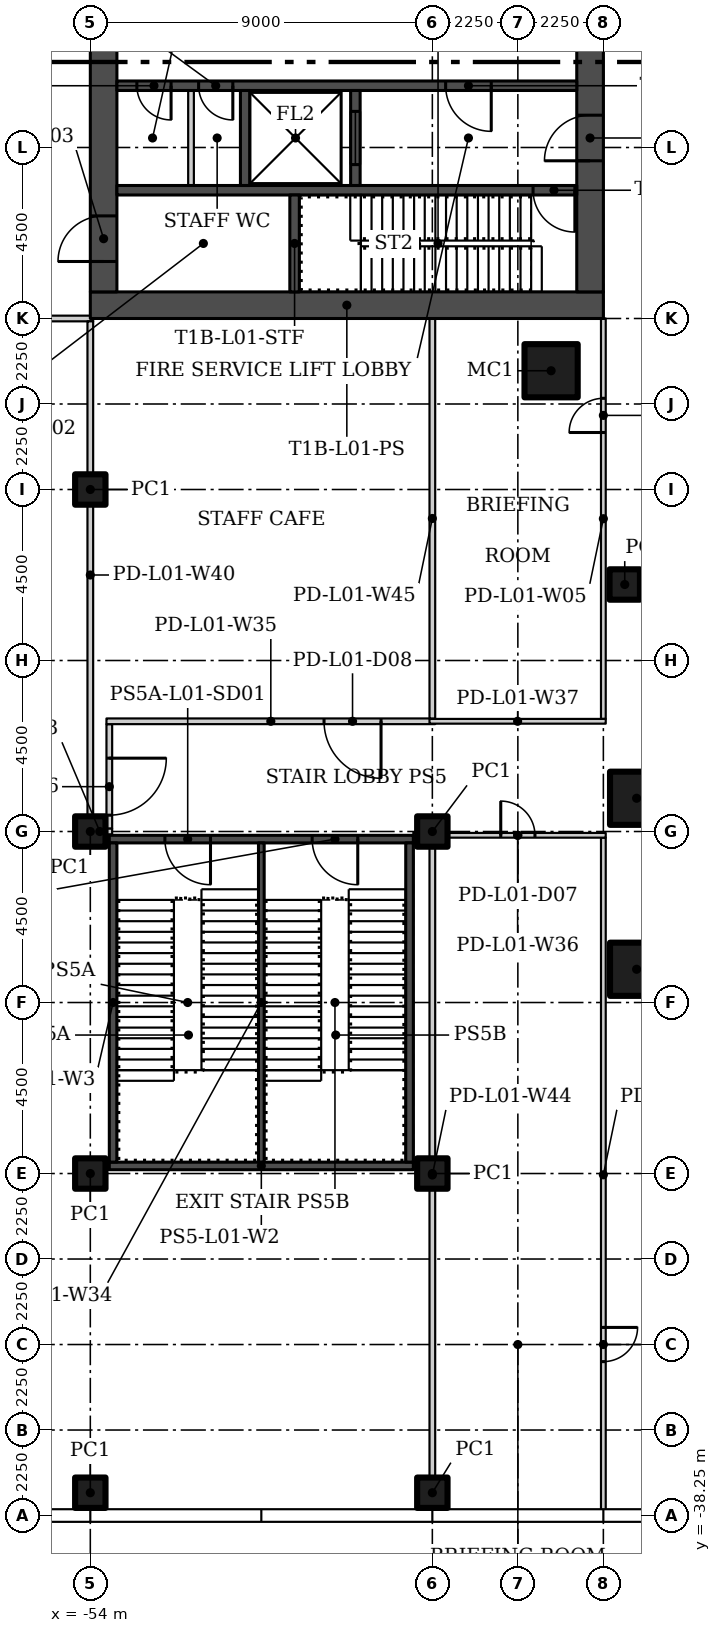
"""IFC4 building model, lengths in metres.
Left out: names, types, materials, properties, quantities, classifications, styles, units other than length and angle.
Written with IfcOpenShell. Run it as: python <this file> out.ifc"""

import sys

from ifc_helpers import new_model, si_unit, direction, frame, frame_2d, origin, origin_2d, place, context, subcontext, project, spatial, rectangle, hollow_rectangle, extrude, element, fill, save


model = new_model("IFC4")
c1 = context("Model", 3, precision=1e-05, world=origin(), true_north=direction((0.0, 1.0)))
c2 = subcontext(c1, "Body", "Model", "MODEL_VIEW")
j1 = project(units=[si_unit("LENGTHUNIT", "METRE"), si_unit("PLANEANGLEUNIT", "RADIAN")], contexts=[c1])
p1 = place(None, origin())
s1 = spatial("IfcSite", under=j1, at=p1, CompositionType="ELEMENT")
p2 = place(p1, origin())
s2 = spatial("IfcBuilding", under=s1, at=p2, CompositionType="ELEMENT")
p3 = place(p2, frame((0.0, 0.0, 6.5)))
s3 = spatial("IfcBuildingStorey", under=s2, at=p3, CompositionType="ELEMENT", Elevation=6.5)
p4 = place(p3, frame((-41.875, -8.125, 0.0)))
e1 = element("IfcColumn", 1, at=p4, inside=s3, PredefinedType="COLUMN", context=c2, shape_type="SweptSolid", body=[
    extrude(hollow_rectangle(XDim=1.4, YDim=1.4, WallThickness=0.06, at=origin_2d()), origin(), (0.0, 0.0, 1.0), 5.6),
])
p5 = place(p3, frame((-39.938, -13.75, 0.0)))
e2 = element("IfcColumn", 2, at=p5, inside=s3, PredefinedType="COLUMN", context=c2, shape_type="SweptSolid", body=[
    extrude(hollow_rectangle(XDim=0.8, YDim=0.8, WallThickness=0.03, at=origin_2d()), origin(), (0.0, 0.0, 1.0), 5.6),
])
for number, where in (
    (3, (-39.625, -19.375, 0.0)),
    (4, (-39.625, -23.875, 0.0)),
):
    element("IfcColumn", number, at=place(p3, frame(where)), inside=s3, PredefinedType="COLUMN", context=c2, shape_type="SweptSolid", body=[
        extrude(hollow_rectangle(XDim=1.4, YDim=1.4, WallThickness=0.06, at=origin_2d()), origin(), (0.0, 0.0, 1.0), 5.6),
    ])
for number, where in (
    (5, (-54.0, -37.65, 0.0)),
    (6, (-54.0, -29.25, 0.0)),
    (7, (-54.0, -20.25, 0.0)),
    (8, (-54.0, -11.25, 0.0)),
    (9, (-45.0, -37.65, 0.0)),
    (10, (-45.0, -29.25, 0.0)),
    (11, (-45.0, -20.25, 0.0)),
):
    element("IfcColumn", number, at=place(p3, frame(where)), inside=s3, PredefinedType="COLUMN", context=c2, shape_type="SweptSolid", body=[
        extrude(hollow_rectangle(XDim=0.8, YDim=0.8, WallThickness=0.03, at=origin_2d()), origin(), (0.0, 0.0, 1.0), 5.6),
    ])
p6 = place(p3, frame((-40.5, -20.412, 0.0), z_axis=(0.0, 0.0, 1.0), x_axis=(0.0, -1.0, 0.0)))
e12 = element("IfcWall", 12, at=p6, inside=s3, PredefinedType="PARTITIONING", context=c2, shape_type="SweptSolid", body=[
    extrude(rectangle(XDim=17.743, YDim=0.125, at=frame_2d((8.872, 0.0))), origin(), (0.0, 0.0, 1.0), 5.6),
])
p7 = place(p6, frame((12.888, 0.0, 0.0)))
e13 = element("IfcOpeningElement", 13, at=p7, cuts=e12, PredefinedType="OPENING", context=c2, shape_type="SweptSolid", body=[
    extrude(rectangle(XDim=0.9, YDim=2.1, at=frame_2d((0.45, 1.05))), frame((0.0, 0.073, 0.0), z_axis=(0.0, -1.0, 0.0), x_axis=(1.0, 0.0, 0.0)), (0.0, 0.0, 1.0), 0.145),
])
p8 = place(p3, frame((-40.5, -17.287, 0.0), z_axis=(0.0, 0.0, 1.0), x_axis=(0.0, 1.0, 0.0)))
e14 = element("IfcWall", 14, at=p8, inside=s3, PredefinedType="PARTITIONING", context=c2, shape_type="SweptSolid", body=[
    extrude(rectangle(XDim=10.537, YDim=0.125, at=frame_2d((5.269, 0.0))), origin(), (0.0, 0.0, 1.0), 5.6),
])
p9 = place(p8, frame((7.537, 0.0, 0.0)))
e15 = element("IfcOpeningElement", 15, at=p9, cuts=e14, PredefinedType="OPENING", context=c2, shape_type="SweptSolid", body=[
    extrude(rectangle(XDim=0.9, YDim=2.1, at=frame_2d((0.45, 1.05))), frame((0.0, 0.073, 0.0), z_axis=(0.0, -1.0, 0.0), x_axis=(1.0, 0.0, 0.0)), (0.0, 0.0, 1.0), 0.145),
])
p10 = place(p3, frame((-67.405, -6.75, 0.0)))
e16 = element("IfcWall", 16, at=p10, inside=s3, PredefinedType="PARTITIONING", context=c2, shape_type="SweptSolid", body=[
    extrude(rectangle(XDim=13.48, YDim=0.15, at=frame_2d((6.74, 0.0))), origin(), (0.0, 0.0, 1.0), 5.6),
])
p11 = place(p10, frame((7.255, 0.0, 0.0)))
e17 = element("IfcOpeningElement", 17, at=p11, cuts=e16, PredefinedType="OPENING", context=c2, shape_type="SweptSolid", body=[
    extrude(rectangle(XDim=1.8, YDim=2.4, at=frame_2d((0.9, 1.2))), frame((0.0, 0.085, 0.0), z_axis=(0.0, -1.0, 0.0), x_axis=(1.0, 0.0, 0.0)), (0.0, 0.0, 1.0), 0.17),
])
p12 = place(p10, frame((10.555, 0.0, 0.0)))
e18 = element("IfcOpeningElement", 18, at=p12, cuts=e16, PredefinedType="OPENING", context=c2, shape_type="SweptSolid", body=[
    extrude(rectangle(XDim=1.8, YDim=2.4, at=frame_2d((0.9, 1.2))), frame((0.0, 0.085, 0.0), z_axis=(0.0, -1.0, 0.0), x_axis=(1.0, 0.0, 0.0)), (0.0, 0.0, 1.0), 0.17),
])
p13 = place(p3, frame((-45.5, -20.35, 0.0)))
e19 = element("IfcWall", 19, at=p13, inside=s3, PredefinedType="PARTITIONING", context=c2, shape_type="SweptSolid", body=[
    extrude(rectangle(XDim=0.575, YDim=0.15, at=frame_2d((0.288, 0.0))), origin(), (0.0, 0.0, 1.0), 5.6),
])
p14 = place(p3, frame((-53.5, -17.425, 0.0), z_axis=(0.0, 0.0, 1.0), x_axis=(0.0, -1.0, 0.0)))
e20 = element("IfcWall", 20, at=p14, inside=s3, PredefinedType="PARTITIONING", context=c2, shape_type="SweptSolid", body=[
    extrude(rectangle(XDim=2.75, YDim=0.15, at=frame_2d((1.375, 0.0))), origin(), (0.0, 0.0, 1.0), 5.6),
])
p15 = place(p14, frame((0.895, 0.0, 0.0)))
e21 = element("IfcOpeningElement", 21, at=p15, cuts=e20, PredefinedType="OPENING", context=c2, shape_type="SweptSolid", body=[
    extrude(rectangle(XDim=1.5, YDim=2.1, at=frame_2d((0.75, 1.05))), frame((0.0, 0.085, 0.0), z_axis=(0.0, -1.0, 0.0), x_axis=(1.0, 0.0, 0.0)), (0.0, 0.0, 1.0), 0.17),
])
p16 = place(p3, frame((-44.925, -17.35, 0.0), z_axis=(0.0, 0.0, 1.0), x_axis=(-1.0, 0.0, 0.0)))
e22 = element("IfcWall", 22, at=p16, inside=s3, PredefinedType="PARTITIONING", context=c2, shape_type="SweptSolid", body=[
    extrude(rectangle(XDim=8.65, YDim=0.15, at=frame_2d((4.325, 0.0))), origin(), (0.0, 0.0, 1.0), 5.6),
])
p17 = place(p16, frame((1.425, 0.0, 0.0)))
e23 = element("IfcOpeningElement", 23, at=p17, cuts=e22, PredefinedType="OPENING", context=c2, shape_type="SweptSolid", body=[
    extrude(rectangle(XDim=1.5, YDim=2.1, at=frame_2d((0.75, 1.05))), frame((0.0, 0.085, 0.0), z_axis=(0.0, -1.0, 0.0), x_axis=(1.0, 0.0, 0.0)), (0.0, 0.0, 1.0), 0.17),
])
p18 = place(p3, frame((-45.075, -20.35, 0.0)))
e24 = element("IfcWall", 24, at=p18, inside=s3, PredefinedType="PARTITIONING", context=c2, shape_type="SweptSolid", body=[
    extrude(rectangle(XDim=4.637, YDim=0.125, at=frame_2d((2.319, 0.0))), origin(), (0.0, 0.0, 1.0), 5.6),
])
p19 = place(p18, frame((1.875, 0.0, 0.0)))
e25 = element("IfcOpeningElement", 25, at=p19, cuts=e24, PredefinedType="OPENING", context=c2, shape_type="SweptSolid", body=[
    extrude(rectangle(XDim=0.9, YDim=2.1, at=frame_2d((0.45, 1.05))), frame((0.0, 0.073, 0.0), z_axis=(0.0, -1.0, 0.0), x_axis=(1.0, 0.0, 0.0)), (0.0, 0.0, 1.0), 0.145),
])
p20 = place(p3, frame((-45.075, -17.35, 0.0)))
e26 = element("IfcWall", 26, at=p20, inside=s3, PredefinedType="PARTITIONING", context=c2, shape_type="SweptSolid", body=[
    extrude(rectangle(XDim=4.637, YDim=0.125, at=frame_2d((2.319, 0.0))), origin(), (0.0, 0.0, 1.0), 5.6),
])
p21 = place(p3, frame((-54.0, -20.175, 0.0), z_axis=(0.0, 0.0, 1.0), x_axis=(0.0, 1.0, 0.0)))
e27 = element("IfcWall", 27, at=p21, inside=s3, PredefinedType="PARTITIONING", context=c2, shape_type="SweptSolid", body=[
    extrude(rectangle(XDim=13.35, YDim=0.15, at=frame_2d((6.675, 0.0))), origin(), (0.0, 0.0, 1.0), 5.6),
])
p22 = place(p3, frame((-53.425, -20.25, 0.0), z_axis=(0.0, 0.0, 1.0), x_axis=(-1.0, 0.0, 0.0)))
e28 = element("IfcWall", 28, at=p22, inside=s3, PredefinedType="PARTITIONING", context=c2, shape_type="SweptSolid", body=[
    extrude(rectangle(XDim=0.65, YDim=0.15, at=frame_2d((0.325, 0.0))), origin(), (0.0, 0.0, 1.0), 5.6),
])
p23 = place(p3, frame((-45.0, -38.155, 0.0), z_axis=(0.0, 0.0, 1.0), x_axis=(0.0, 1.0, 0.0)))
e29 = element("IfcWall", 29, at=p23, inside=s3, PredefinedType="PARTITIONING", context=c2, shape_type="SweptSolid", body=[
    extrude(rectangle(XDim=17.73, YDim=0.15, at=frame_2d((8.865, 0.0))), origin(), (0.0, 0.0, 1.0), 5.6),
])
p24 = place(p3, frame((-45.0, -17.275, 0.0), z_axis=(0.0, 0.0, 1.0), x_axis=(0.0, 1.0, 0.0)))
e30 = element("IfcWall", 30, at=p24, inside=s3, PredefinedType="PARTITIONING", context=c2, shape_type="SweptSolid", body=[
    extrude(rectangle(XDim=10.525, YDim=0.15, at=frame_2d((5.262, 0.0))), origin(), (0.0, 0.0, 1.0), 5.6),
])
p25 = place(p3, frame((-40.5, -6.4, 0.0), z_axis=(0.0, 0.0, 1.0), x_axis=(-1.0, 0.0, 0.0)))
e31 = element("IfcWall", 31, at=p25, inside=s3, PredefinedType="SHEAR", context=c2, shape_type="SweptSolid", body=[
    extrude(rectangle(XDim=13.5, YDim=0.7, at=frame_2d((6.75, 0.0))), origin(), (0.0, 0.0, 1.0), 5.6),
])
p26 = place(p3, frame((-40.85, -6.05, 0.0), z_axis=(0.0, 0.0, 1.0), x_axis=(0.0, 1.0, 0.0)))
e32 = element("IfcWall", 32, at=p26, inside=s3, PredefinedType="SHEAR", context=c2, shape_type="SweptSolid", body=[
    extrude(rectangle(XDim=12.1, YDim=0.7, at=frame_2d((6.05, 0.0))), origin(), (0.0, 0.0, 1.0), 5.6),
])
p27 = place(p26, frame((3.45, 0.0, 0.0)))
e33 = element("IfcOpeningElement", 33, at=p27, cuts=e32, PredefinedType="OPENING", context=c2, shape_type="SweptSolid", body=[
    extrude(rectangle(XDim=1.2, YDim=2.1, at=frame_2d((0.6, 1.05))), frame((0.0, 0.36, 0.0), z_axis=(0.0, -1.0, 0.0), x_axis=(1.0, 0.0, 0.0)), (0.0, 0.0, 1.0), 0.72),
])
p28 = place(p26, frame((6.4, 0.0, 0.0)))
e34 = element("IfcOpeningElement", 34, at=p28, cuts=e32, PredefinedType="OPENING", context=c2, shape_type="SweptSolid", body=[
    extrude(rectangle(XDim=1.8, YDim=2.4, at=frame_2d((0.9, 1.2))), frame((0.0, 0.36, 0.0), z_axis=(0.0, -1.0, 0.0), x_axis=(1.0, 0.0, 0.0)), (0.0, 0.0, 1.0), 0.72),
])
p29 = place(p3, frame((-53.65, -6.05, 0.0), z_axis=(0.0, 0.0, 1.0), x_axis=(0.0, 1.0, 0.0)))
e35 = element("IfcWall", 35, at=p29, inside=s3, PredefinedType="SHEAR", context=c2, shape_type="SweptSolid", body=[
    extrude(rectangle(XDim=12.1, YDim=0.7, at=frame_2d((6.05, 0.0))), origin(), (0.0, 0.0, 1.0), 5.6),
])
p30 = place(p29, frame((0.8, 0.0, 0.0)))
e36 = element("IfcOpeningElement", 36, at=p30, cuts=e35, PredefinedType="OPENING", context=c2, shape_type="SweptSolid", body=[
    extrude(rectangle(XDim=1.2, YDim=2.1, at=frame_2d((0.6, 1.05))), frame((0.0, 0.36, 0.0), z_axis=(0.0, -1.0, 0.0), x_axis=(1.0, 0.0, 0.0)), (0.0, 0.0, 1.0), 0.72),
])
p31 = place(p29, frame((6.4, 0.0, 0.0)))
e37 = element("IfcOpeningElement", 37, at=p31, cuts=e35, PredefinedType="OPENING", context=c2, shape_type="SweptSolid", body=[
    extrude(rectangle(XDim=1.8, YDim=2.4, at=frame_2d((0.9, 1.2))), frame((0.0, 0.36, 0.0), z_axis=(0.0, -1.0, 0.0), x_axis=(1.0, 0.0, 0.0)), (0.0, 0.0, 1.0), 0.72),
])
p32 = place(p3, frame((-41.2, -3.375, 0.0), z_axis=(0.0, 0.0, 1.0), x_axis=(-1.0, 0.0, 0.0)))
e38 = element("IfcWall", 38, at=p32, inside=s3, PredefinedType="SHEAR", context=c2, shape_type="SweptSolid", body=[
    extrude(rectangle(XDim=12.1, YDim=0.25, at=frame_2d((6.05, 0.0))), origin(), (0.0, 0.0, 1.0), 5.6),
])
p33 = place(p32, frame((0.05, 0.0, 0.0)))
e39 = element("IfcOpeningElement", 39, at=p33, cuts=e38, PredefinedType="OPENING", context=c2, shape_type="SweptSolid", body=[
    extrude(rectangle(XDim=1.1, YDim=2.1, at=frame_2d((0.55, 1.05))), frame((0.0, 0.135, 0.0), z_axis=(0.0, -1.0, 0.0), x_axis=(1.0, 0.0, 0.0)), (0.0, 0.0, 1.0), 0.27),
])
p34 = place(p3, frame((-48.625, -6.05, 0.0), z_axis=(0.0, 0.0, 1.0), x_axis=(0.0, 1.0, 0.0)))
e40 = element("IfcWall", 40, at=p34, inside=s3, PredefinedType="SHEAR", context=c2, shape_type="SweptSolid", body=[
    extrude(rectangle(XDim=2.55, YDim=0.25, at=frame_2d((1.275, 0.0))), origin(), (0.0, 0.0, 1.0), 5.6),
])
p35 = place(p3, frame((-41.2, -0.625, 0.0), z_axis=(0.0, 0.0, 1.0), x_axis=(-1.0, 0.0, 0.0)))
e41 = element("IfcWall", 41, at=p35, inside=s3, PredefinedType="SHEAR", context=c2, shape_type="SweptSolid", body=[
    extrude(rectangle(XDim=12.1, YDim=0.25, at=frame_2d((6.05, 0.0))), origin(), (0.0, 0.0, 1.0), 5.6),
])
p36 = place(p35, frame((2.25, 0.0, 0.0)))
e42 = element("IfcOpeningElement", 42, at=p36, cuts=e41, PredefinedType="OPENING", context=c2, shape_type="SweptSolid", body=[
    extrude(rectangle(XDim=1.2, YDim=2.1, at=frame_2d((0.6, 1.05))), frame((0.0, 0.135, 0.0), z_axis=(0.0, -1.0, 0.0), x_axis=(1.0, 0.0, 0.0)), (0.0, 0.0, 1.0), 0.27),
])
p37 = place(p35, frame((9.05, 0.0, 0.0)))
e43 = element("IfcOpeningElement", 43, at=p37, cuts=e41, PredefinedType="OPENING", context=c2, shape_type="SweptSolid", body=[
    extrude(rectangle(XDim=0.9, YDim=2.1, at=frame_2d((0.45, 1.05))), frame((0.0, 0.135, 0.0), z_axis=(0.0, -1.0, 0.0), x_axis=(1.0, 0.0, 0.0)), (0.0, 0.0, 1.0), 0.27),
])
p38 = place(p35, frame((10.675, 0.0, 0.0)))
e44 = element("IfcOpeningElement", 44, at=p38, cuts=e41, PredefinedType="OPENING", context=c2, shape_type="SweptSolid", body=[
    extrude(rectangle(XDim=0.9, YDim=2.1, at=frame_2d((0.45, 1.05))), frame((0.0, 0.135, 0.0), z_axis=(0.0, -1.0, 0.0), x_axis=(1.0, 0.0, 0.0)), (0.0, 0.0, 1.0), 0.27),
])
p39 = place(p3, frame((-47.025, -3.25, 0.0), z_axis=(0.0, 0.0, 1.0), x_axis=(0.0, 1.0, 0.0)))
e45 = element("IfcWall", 45, at=p39, inside=s3, PredefinedType="SHEAR", context=c2, shape_type="SweptSolid", body=[
    extrude(rectangle(XDim=2.5, YDim=0.25, at=frame_2d((1.25, 0.0))), origin(), (0.0, 0.0, 1.0), 5.6),
])
p40 = place(p39, frame((0.55, 0.0, 0.0)))
e46 = element("IfcOpeningElement", 46, at=p40, cuts=e45, PredefinedType="OPENING", context=c2, shape_type="SweptSolid", body=[
    extrude(rectangle(XDim=1.4, YDim=2.4, at=frame_2d((0.7, 1.2))), frame((0.0, 0.135, 0.0), z_axis=(0.0, -1.0, 0.0), x_axis=(1.0, 0.0, 0.0)), (0.0, 0.0, 1.0), 0.27),
])
p41 = place(p3, frame((-49.925, -3.25, 0.0), z_axis=(0.0, 0.0, 1.0), x_axis=(0.0, 1.0, 0.0)))
e47 = element("IfcWall", 47, at=p41, inside=s3, PredefinedType="SHEAR", context=c2, shape_type="SweptSolid", body=[
    extrude(rectangle(XDim=2.5, YDim=0.25, at=frame_2d((1.25, 0.0))), origin(), (0.0, 0.0, 1.0), 5.6),
])
p42 = place(p3, frame((-51.35, -3.25, 0.0), z_axis=(0.0, 0.0, 1.0), x_axis=(0.0, 1.0, 0.0)))
e48 = element("IfcWall", 48, at=p42, inside=s3, PredefinedType="PARTITIONING", context=c2, shape_type="SweptSolid", body=[
    extrude(rectangle(XDim=2.5, YDim=0.15, at=frame_2d((1.25, 0.0))), origin(), (0.0, 0.0, 1.0), 5.6),
])
p43 = place(p3, frame((-45.5, -20.45, 0.0), z_axis=(0.0, 0.0, 1.0), x_axis=(-1.0, 0.0, 0.0)))
e49 = element("IfcWall", 49, at=p43, inside=s3, PredefinedType="SHEAR", context=c2, shape_type="SweptSolid", body=[
    extrude(rectangle(XDim=8.0, YDim=0.2, at=frame_2d((4.0, 0.0))), origin(), (0.0, 0.0, 1.0), 5.6),
])
p44 = place(p43, frame((5.337, 0.0, 0.0)))
e50 = element("IfcOpeningElement", 50, at=p44, cuts=e49, PredefinedType="OPENING", context=c2, shape_type="SweptSolid", body=[
    extrude(rectangle(XDim=1.2, YDim=2.4, at=frame_2d((0.6, 1.2))), frame((0.0, 0.11, 0.0), z_axis=(0.0, -1.0, 0.0), x_axis=(1.0, 0.0, 0.0)), (0.0, 0.0, 1.0), 0.22),
])
p45 = place(p43, frame((1.462, 0.0, 0.0)))
e51 = element("IfcOpeningElement", 51, at=p45, cuts=e49, PredefinedType="OPENING", context=c2, shape_type="SweptSolid", body=[
    extrude(rectangle(XDim=1.2, YDim=2.4, at=frame_2d((0.6, 1.2))), frame((0.0, 0.11, 0.0), z_axis=(0.0, -1.0, 0.0), x_axis=(1.0, 0.0, 0.0)), (0.0, 0.0, 1.0), 0.22),
])
p46 = place(p3, frame((-53.5, -29.05, 0.0)))
e52 = element("IfcWall", 52, at=p46, inside=s3, PredefinedType="SHEAR", context=c2, shape_type="SweptSolid", body=[
    extrude(rectangle(XDim=8.0, YDim=0.2, at=frame_2d((4.0, 0.0))), origin(), (0.0, 0.0, 1.0), 5.6),
])
for number, where, z_axis, x_axis in (
    (53, (-53.4, -28.95, 0.0), (0.0, 0.0, 1.0), (0.0, 1.0, 0.0)),
    (54, (-45.6, -28.95, 0.0), (0.0, 0.0, 1.0), (0.0, 1.0, 0.0)),
):
    element("IfcWall", number, at=place(p3, frame(where, z_axis=z_axis, x_axis=x_axis)), inside=s3, PredefinedType="SHEAR", context=c2, shape_type="SweptSolid", body=[
        extrude(rectangle(XDim=8.4, YDim=0.2, at=frame_2d((4.2, 0.0))), origin(), (0.0, 0.0, 1.0), 5.6),
    ])
p47 = place(p3, frame((-49.5, -28.95, 0.0), z_axis=(0.0, 0.0, 1.0), x_axis=(0.0, 1.0, 0.0)))
e55 = element("IfcWall", 55, at=p47, inside=s3, PredefinedType="SHEAR", context=c2, shape_type="SweptSolid", body=[
    extrude(rectangle(XDim=8.4, YDim=0.15, at=frame_2d((4.2, 0.0))), origin(), (0.0, 0.0, 1.0), 5.6),
])
p48 = place(p15, origin())
e56 = element("IfcDoor", 56, at=p48, inside=s3, OperationType="DOUBLE_DOOR_SINGLE_SWING", PredefinedType="DOOR", context=c2, shape_type="SweptSolid", body=[
    extrude(rectangle(XDim=1.5, YDim=2.1, at=frame_2d((0.75, 1.05))), frame((0.0, 0.025, 0.0), z_axis=(0.0, -1.0, 0.0), x_axis=(1.0, 0.0, 0.0)), (0.0, 0.0, 1.0), 0.05),
])
fill(e21, e56)
p49 = place(p19, origin())
e57 = element("IfcDoor", 57, at=p49, inside=s3, OperationType="SINGLE_SWING_LEFT", PredefinedType="DOOR", context=c2, shape_type="SweptSolid", body=[
    extrude(rectangle(XDim=0.9, YDim=2.1, at=frame_2d((0.45, 1.05))), frame((0.0, 0.025, 0.0), z_axis=(0.0, -1.0, 0.0), x_axis=(1.0, 0.0, 0.0)), (0.0, 0.0, 1.0), 0.05),
])
fill(e25, e57)
p50 = place(p17, origin())
e58 = element("IfcDoor", 58, at=p50, inside=s3, OperationType="DOUBLE_DOOR_SINGLE_SWING", PredefinedType="DOOR", context=c2, shape_type="SweptSolid", body=[
    extrude(rectangle(XDim=1.5, YDim=2.1, at=frame_2d((0.75, 1.05))), frame((0.0, 0.025, 0.0), z_axis=(0.0, -1.0, 0.0), x_axis=(1.0, 0.0, 0.0)), (0.0, 0.0, 1.0), 0.05),
])
fill(e23, e58)
p51 = place(p7, origin())
e59 = element("IfcDoor", 59, at=p51, inside=s3, OperationType="SINGLE_SWING_RIGHT", PredefinedType="DOOR", context=c2, shape_type="SweptSolid", body=[
    extrude(rectangle(XDim=0.9, YDim=2.1, at=frame_2d((0.45, 1.05))), frame((0.0, 0.025, 0.0), z_axis=(0.0, -1.0, 0.0), x_axis=(1.0, 0.0, 0.0)), (0.0, 0.0, 1.0), 0.05),
])
fill(e13, e59)
p52 = place(p9, origin())
e60 = element("IfcDoor", 60, at=p52, inside=s3, OperationType="SINGLE_SWING_LEFT", PredefinedType="DOOR", context=c2, shape_type="SweptSolid", body=[
    extrude(rectangle(XDim=0.9, YDim=2.1, at=frame_2d((0.45, 1.05))), frame((0.0, 0.025, 0.0), z_axis=(0.0, -1.0, 0.0), x_axis=(1.0, 0.0, 0.0)), (0.0, 0.0, 1.0), 0.05),
])
fill(e15, e60)
p53 = place(p27, origin())
e61 = element("IfcDoor", 61, at=p53, inside=s3, OperationType="SINGLE_SWING_LEFT", PredefinedType="DOOR", context=c2, shape_type="SweptSolid", body=[
    extrude(rectangle(XDim=1.2, YDim=2.1, at=frame_2d((0.6, 1.05))), frame((0.0, 0.025, 0.0), z_axis=(0.0, -1.0, 0.0), x_axis=(1.0, 0.0, 0.0)), (0.0, 0.0, 1.0), 0.05),
])
fill(e33, e61)
p54 = place(p30, origin())
e62 = element("IfcDoor", 62, at=p54, inside=s3, OperationType="SINGLE_SWING_LEFT", PredefinedType="DOOR", context=c2, shape_type="SweptSolid", body=[
    extrude(rectangle(XDim=1.2, YDim=2.1, at=frame_2d((0.6, 1.05))), frame((0.0, 0.025, 0.0), z_axis=(0.0, -1.0, 0.0), x_axis=(1.0, 0.0, 0.0)), (0.0, 0.0, 1.0), 0.05),
])
fill(e36, e62)
p55 = place(p33, origin())
e63 = element("IfcDoor", 63, at=p55, inside=s3, OperationType="SINGLE_SWING_LEFT", PredefinedType="DOOR", context=c2, shape_type="SweptSolid", body=[
    extrude(rectangle(XDim=1.1, YDim=2.1, at=frame_2d((0.55, 1.05))), frame((0.0, 0.025, 0.0), z_axis=(0.0, -1.0, 0.0), x_axis=(1.0, 0.0, 0.0)), (0.0, 0.0, 1.0), 0.05),
])
fill(e39, e63)
p56 = place(p36, origin())
e64 = element("IfcDoor", 64, at=p56, inside=s3, OperationType="SINGLE_SWING_LEFT", PredefinedType="DOOR", context=c2, shape_type="SweptSolid", body=[
    extrude(rectangle(XDim=1.2, YDim=2.1, at=frame_2d((0.6, 1.05))), frame((0.0, 0.025, 0.0), z_axis=(0.0, -1.0, 0.0), x_axis=(1.0, 0.0, 0.0)), (0.0, 0.0, 1.0), 0.05),
])
fill(e42, e64)
p57 = place(p37, origin())
e65 = element("IfcDoor", 65, at=p57, inside=s3, OperationType="SINGLE_SWING_RIGHT", PredefinedType="DOOR", context=c2, shape_type="SweptSolid", body=[
    extrude(rectangle(XDim=0.9, YDim=2.1, at=frame_2d((0.45, 1.05))), frame((0.0, 0.025, 0.0), z_axis=(0.0, -1.0, 0.0), x_axis=(1.0, 0.0, 0.0)), (0.0, 0.0, 1.0), 0.05),
])
fill(e43, e65)
p58 = place(p38, origin())
e66 = element("IfcDoor", 66, at=p58, inside=s3, OperationType="SINGLE_SWING_RIGHT", PredefinedType="DOOR", context=c2, shape_type="SweptSolid", body=[
    extrude(rectangle(XDim=0.9, YDim=2.1, at=frame_2d((0.45, 1.05))), frame((0.0, 0.025, 0.0), z_axis=(0.0, -1.0, 0.0), x_axis=(1.0, 0.0, 0.0)), (0.0, 0.0, 1.0), 0.05),
])
fill(e44, e66)
p59 = place(p40, origin())
e67 = element("IfcDoor", 67, at=p59, inside=s3, OperationType="SLIDING_TO_LEFT", PredefinedType="DOOR", context=c2, shape_type="SweptSolid", body=[
    extrude(rectangle(XDim=1.4, YDim=2.4, at=frame_2d((0.7, 1.2))), frame((0.0, 0.025, 0.0), z_axis=(0.0, -1.0, 0.0), x_axis=(1.0, 0.0, 0.0)), (0.0, 0.0, 1.0), 0.05),
])
fill(e46, e67)
p60 = place(p44, origin())
e68 = element("IfcDoor", 68, at=p60, inside=s3, OperationType="SINGLE_SWING_LEFT", PredefinedType="DOOR", context=c2, shape_type="SweptSolid", body=[
    extrude(rectangle(XDim=1.2, YDim=2.4, at=frame_2d((0.6, 1.2))), frame((0.0, 0.025, 0.0), z_axis=(0.0, -1.0, 0.0), x_axis=(1.0, 0.0, 0.0)), (0.0, 0.0, 1.0), 0.05),
])
fill(e50, e68)
p61 = place(p45, origin())
e69 = element("IfcDoor", 69, at=p61, inside=s3, OperationType="SINGLE_SWING_RIGHT", PredefinedType="DOOR", context=c2, shape_type="SweptSolid", body=[
    extrude(rectangle(XDim=1.2, YDim=2.4, at=frame_2d((0.6, 1.2))), frame((0.0, 0.025, 0.0), z_axis=(0.0, -1.0, 0.0), x_axis=(1.0, 0.0, 0.0)), (0.0, 0.0, 1.0), 0.05),
])
fill(e51, e69)
save(model, sys.argv[1])
